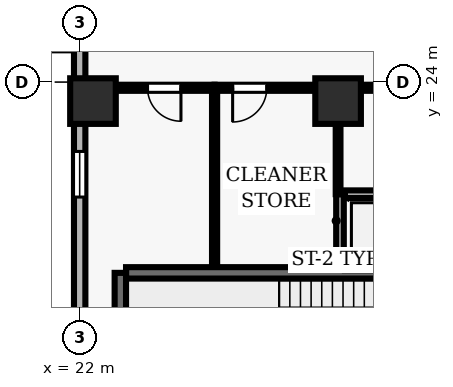
"""IFC4 building model, lengths in metres.
Left out: names, types, materials, properties, quantities, classifications, styles, units other than length and angle.
Written with IfcOpenShell. Run it as: python <this file> out.ifc"""

import sys

from ifc_helpers import new_model, si_unit, direction, frame, frame_2d, origin, origin_2d, place, context, subcontext, project, spatial, rectangle, extrude, element, fill, save


model = new_model("IFC4")
c1 = context("Model", 3, precision=1e-05, world=origin(), true_north=direction((0.0, 1.0)))
c2 = subcontext(c1, "Body", "Model", "MODEL_VIEW")
j1 = project(units=[si_unit("LENGTHUNIT", "METRE"), si_unit("PLANEANGLEUNIT", "RADIAN")], contexts=[c1])
p1 = place(None, origin())
s1 = spatial("IfcSite", under=j1, at=p1, CompositionType="ELEMENT")
p2 = place(p1, origin())
s2 = spatial("IfcBuilding", under=s1, at=p2, CompositionType="ELEMENT")
p3 = place(p2, frame((0.0, 0.0, 150.2)))
s3 = spatial("IfcBuildingStorey", under=s2, at=p3, CompositionType="ELEMENT", Elevation=150.2)
for number, where, z_axis, x_axis in (
    (1, (22.35, 23.5, 0.0), (0.0, 0.0, 1.0), (1.0, 0.0, 0.0)),
    (2, (28.8, 23.5, 0.0), (0.0, 0.0, 1.0), (1.0, 0.0, 0.0)),
):
    element("IfcColumn", number, at=place(p3, frame(where, z_axis=z_axis, x_axis=x_axis)), inside=s3, PredefinedType="COLUMN", context=c2, shape_type="SweptSolid", body=[
        extrude(rectangle(XDim=1.2, YDim=1.2, at=origin_2d()), origin(), (0.0, 0.0, 1.0), 3.9),
    ])
p4 = place(p3, frame((22.0, 46.1, 0.0), z_axis=(0.0, 0.0, 1.0), x_axis=(0.0, -1.0, 0.0)))
e3 = element("IfcWall", 3, at=p4, inside=s3, PredefinedType="SOLIDWALL", context=c2, shape_type="SweptSolid", body=[
    extrude(rectangle(XDim=43.6, YDim=0.3, at=frame_2d((21.8, 0.0))), origin(), (0.0, 0.0, 1.0), 3.69),
])
p5 = place(p4, frame((6.5, 0.0, 0.0)))
e4 = element("IfcOpeningElement", 4, at=p5, cuts=e3, PredefinedType="OPENING", context=c2, shape_type="SweptSolid", body=[
    extrude(rectangle(XDim=1.0, YDim=2.2, at=frame_2d((0.5, 1.1))), frame((0.0, 0.16, 0.0), z_axis=(0.0, -1.0, 0.0), x_axis=(1.0, 0.0, 0.0)), (0.0, 0.0, 1.0), 0.32),
])
p6 = place(p4, frame((12.125, 0.0, 0.9)))
e5 = element("IfcOpeningElement", 5, at=p6, cuts=e3, PredefinedType="OPENING", context=c2, shape_type="SweptSolid", body=[
    extrude(rectangle(XDim=1.2, YDim=1.6, at=frame_2d((0.6, 0.8))), frame((0.0, 0.16, 0.0), z_axis=(0.0, -1.0, 0.0), x_axis=(1.0, 0.0, 0.0)), (0.0, 0.0, 1.0), 0.32),
])
p7 = place(p4, frame((18.025, 0.0, 0.9)))
e6 = element("IfcOpeningElement", 6, at=p7, cuts=e3, PredefinedType="OPENING", context=c2, shape_type="SweptSolid", body=[
    extrude(rectangle(XDim=1.2, YDim=1.6, at=frame_2d((0.6, 0.8))), frame((0.0, 0.16, 0.0), z_axis=(0.0, -1.0, 0.0), x_axis=(1.0, 0.0, 0.0)), (0.0, 0.0, 1.0), 0.32),
])
p8 = place(p4, frame((23.925, 0.0, 0.9)))
e7 = element("IfcOpeningElement", 7, at=p8, cuts=e3, PredefinedType="OPENING", context=c2, shape_type="SweptSolid", body=[
    extrude(rectangle(XDim=1.2, YDim=1.6, at=frame_2d((0.6, 0.8))), frame((0.0, 0.16, 0.0), z_axis=(0.0, -1.0, 0.0), x_axis=(1.0, 0.0, 0.0)), (0.0, 0.0, 1.0), 0.32),
])
p9 = place(p4, frame((29.375, 0.0, 0.9)))
e8 = element("IfcOpeningElement", 8, at=p9, cuts=e3, PredefinedType="OPENING", context=c2, shape_type="SweptSolid", body=[
    extrude(rectangle(XDim=1.2, YDim=1.6, at=frame_2d((0.6, 0.8))), frame((0.0, 0.16, 0.0), z_axis=(0.0, -1.0, 0.0), x_axis=(1.0, 0.0, 0.0)), (0.0, 0.0, 1.0), 0.32),
])
p10 = place(p4, frame((34.825, 0.0, 0.9)))
e9 = element("IfcOpeningElement", 9, at=p10, cuts=e3, PredefinedType="OPENING", context=c2, shape_type="SweptSolid", body=[
    extrude(rectangle(XDim=1.2, YDim=1.6, at=frame_2d((0.6, 0.8))), frame((0.0, 0.16, 0.0), z_axis=(0.0, -1.0, 0.0), x_axis=(1.0, 0.0, 0.0)), (0.0, 0.0, 1.0), 0.32),
])
p11 = place(p3, frame((31.58, 18.98, 0.0), z_axis=(0.0, 0.0, 1.0), x_axis=(-1.0, 0.0, 0.0)))
e10 = element("IfcWall", 10, at=p11, inside=s3, PredefinedType="SHEAR", context=c2, shape_type="SweptSolid", body=[
    extrude(rectangle(XDim=8.36, YDim=0.3, at=frame_2d((4.18, 0.0))), origin(), (0.0, 0.0, 1.0), 3.69),
])
p12 = place(p3, frame((23.07, 18.98, 0.0), z_axis=(0.0, 0.0, 1.0), x_axis=(0.0, -1.0, 0.0)))
e11 = element("IfcWall", 11, at=p12, inside=s3, PredefinedType="SHEAR", context=c2, shape_type="SweptSolid", body=[
    extrude(rectangle(XDim=3.51, YDim=0.3, at=frame_2d((1.755, 0.0))), origin(), (0.0, 0.0, 1.0), 3.69),
])
p13 = place(p3, frame((28.85, 21.05, 0.0), z_axis=(0.0, 0.0, 1.0), x_axis=(0.0, -1.0, 0.0)))
e12 = element("IfcWall", 12, at=p13, inside=s3, PredefinedType="SOLIDWALL", context=c2, shape_type="SweptSolid", body=[
    extrude(rectangle(XDim=1.9, YDim=0.2, at=frame_2d((0.95, 0.0))), origin(), (0.0, 0.0, 1.0), 3.69),
])
for number, where, z_axis, x_axis in (
    (13, (28.98, 19.15, 0.0), (0.0, 0.0, 1.0), (1.0, 0.0, 0.0)),
    (14, (31.42, 21.05, 0.0), (0.0, 0.0, 1.0), (-1.0, 0.0, 0.0)),
):
    element("IfcWall", number, at=place(p3, frame(where, z_axis=z_axis, x_axis=x_axis)), inside=s3, PredefinedType="SOLIDWALL", context=c2, shape_type="SweptSolid", body=[
        extrude(rectangle(XDim=2.44, YDim=0.2, at=frame_2d((1.22, 0.0))), origin(), (0.0, 0.0, 1.0), 3.69),
    ])
p14 = place(p3, frame((25.55, 23.85, 0.0), z_axis=(0.0, 0.0, 1.0), x_axis=(-1.0, 0.0, 0.0)))
e15 = element("IfcWall", 15, at=p14, inside=s3, PredefinedType="PARTITIONING", context=c2, shape_type="SweptSolid", body=[
    extrude(rectangle(XDim=3.35, YDim=0.16, at=frame_2d((1.675, 0.0))), origin(), (0.0, 0.0, 1.0), 3.074),
])
p15 = place(p14, frame((0.885, 0.0, 0.0)))
e16 = element("IfcOpeningElement", 16, at=p15, cuts=e15, PredefinedType="OPENING", context=c2, shape_type="SweptSolid", body=[
    extrude(rectangle(XDim=0.88, YDim=2.1, at=frame_2d((0.44, 1.05))), frame((0.0, 0.09, 0.0), z_axis=(0.0, -1.0, 0.0), x_axis=(1.0, 0.0, 0.0)), (0.0, 0.0, 1.0), 0.18),
])
p16 = place(p3, frame((28.8, 23.85, 0.0), z_axis=(0.0, 0.0, 1.0), x_axis=(-1.0, 0.0, 0.0)))
e17 = element("IfcWall", 17, at=p16, inside=s3, PredefinedType="PARTITIONING", context=c2, shape_type="SweptSolid", body=[
    extrude(rectangle(XDim=3.25, YDim=0.16, at=frame_2d((1.625, 0.0))), origin(), (0.0, 0.0, 1.0), 3.074),
])
p17 = place(p16, frame((1.875, 0.0, 0.0)))
e18 = element("IfcOpeningElement", 18, at=p17, cuts=e17, PredefinedType="OPENING", context=c2, shape_type="SweptSolid", body=[
    extrude(rectangle(XDim=0.9, YDim=2.1, at=frame_2d((0.45, 1.05))), frame((0.0, 0.09, 0.0), z_axis=(0.0, -1.0, 0.0), x_axis=(1.0, 0.0, 0.0)), (0.0, 0.0, 1.0), 0.18),
])
p18 = place(p3, frame((31.65, 23.85, 0.0), z_axis=(0.0, 0.0, 1.0), x_axis=(-1.0, 0.0, 0.0)))
e19 = element("IfcWall", 19, at=p18, inside=s3, PredefinedType="PARTITIONING", context=c2, shape_type="SweptSolid", body=[
    extrude(rectangle(XDim=2.85, YDim=0.16, at=frame_2d((1.425, 0.0))), origin(), (0.0, 0.0, 1.0), 3.074),
])
p19 = place(p3, frame((25.55, 19.16, 0.0), z_axis=(0.0, 0.0, 1.0), x_axis=(0.0, 1.0, 0.0)))
e20 = element("IfcWall", 20, at=p19, inside=s3, PredefinedType="PARTITIONING", context=c2, shape_type="SweptSolid", body=[
    extrude(rectangle(XDim=4.615, YDim=0.135, at=frame_2d((2.308, 0.0))), origin(), (0.0, 0.0, 1.0), 3.69),
])
p20 = place(p3, frame((28.8, 23.775, 0.0), z_axis=(0.0, 0.0, 1.0), x_axis=(0.0, -1.0, 0.0)))
e21 = element("IfcWall", 21, at=p20, inside=s3, PredefinedType="PARTITIONING", context=c2, shape_type="SweptSolid", body=[
    extrude(rectangle(XDim=2.725, YDim=0.125, at=frame_2d((1.362, 0.0))), origin(), (0.0, 0.0, 1.0), 3.69),
])
p21 = place(p8, origin())
e22 = element("IfcWindow", 22, at=p21, inside=s3, PartitioningType="SINGLE_PANEL", PredefinedType="WINDOW", context=c2, shape_type="SweptSolid", body=[
    extrude(rectangle(XDim=1.2, YDim=1.6, at=frame_2d((0.6, 0.8))), frame((0.0, 0.03, 0.0), z_axis=(0.0, -1.0, 0.0), x_axis=(1.0, 0.0, 0.0)), (0.0, 0.0, 1.0), 0.06),
])
fill(e7, e22)
p22 = place(p15, origin())
e23 = element("IfcDoor", 23, at=p22, inside=s3, OperationType="SINGLE_SWING_LEFT", PredefinedType="DOOR", context=c2, shape_type="SweptSolid", body=[
    extrude(rectangle(XDim=0.88, YDim=2.1, at=frame_2d((0.44, 1.05))), frame((0.0, 0.025, 0.0), z_axis=(0.0, -1.0, 0.0), x_axis=(1.0, 0.0, 0.0)), (0.0, 0.0, 1.0), 0.05),
])
fill(e16, e23)
p23 = place(p17, origin())
e24 = element("IfcDoor", 24, at=p23, inside=s3, OperationType="SINGLE_SWING_RIGHT", PredefinedType="DOOR", context=c2, shape_type="SweptSolid", body=[
    extrude(rectangle(XDim=0.9, YDim=2.1, at=frame_2d((0.45, 1.05))), frame((0.0, 0.025, 0.0), z_axis=(0.0, -1.0, 0.0), x_axis=(1.0, 0.0, 0.0)), (0.0, 0.0, 1.0), 0.05),
])
fill(e18, e24)
save(model, sys.argv[1])
